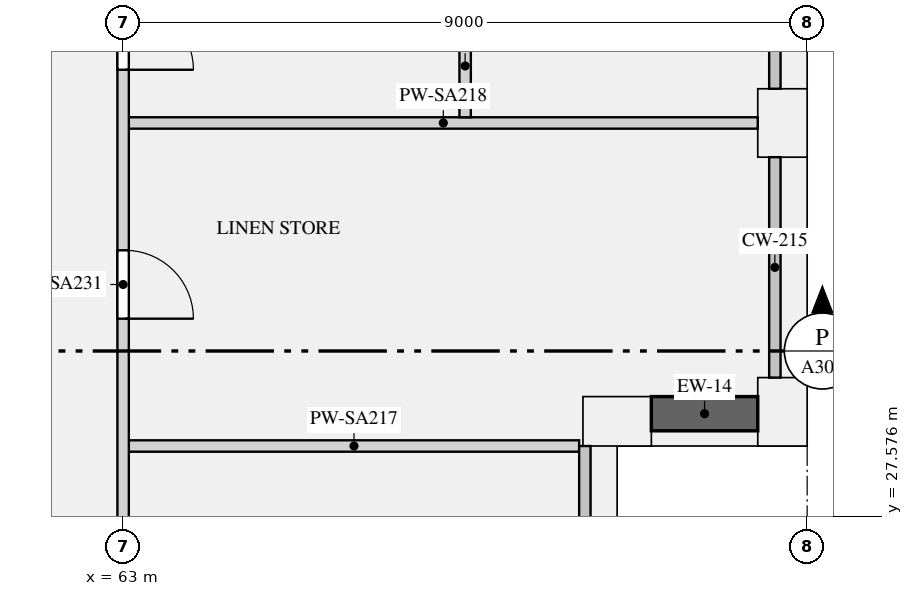
"""IFC4 building model, lengths in metres.
Left out: names, types, materials, properties, quantities, classifications, styles, units other than length and angle.
Written with IfcOpenShell. Run it as: python <this file> out.ifc"""

import sys

from ifc_helpers import new_model, si_unit, direction, frame, frame_2d, origin, origin_2d, place, context, subcontext, project, spatial, rectangle, extrude, element, fill, save


model = new_model("IFC4")
c1 = context("Model", 3, precision=1e-05, world=origin(), true_north=direction((0.0, 1.0)))
c2 = subcontext(c1, "Body", "Model", "MODEL_VIEW")
j1 = project(units=[si_unit("LENGTHUNIT", "METRE"), si_unit("PLANEANGLEUNIT", "RADIAN")], contexts=[c1])
p1 = place(None, origin())
s1 = spatial("IfcSite", under=j1, at=p1, CompositionType="ELEMENT")
p2 = place(p1, origin())
s2 = spatial("IfcBuilding", under=s1, at=p2, CompositionType="ELEMENT")
p3 = place(p2, frame((0.0, 0.0, 191.7)))
s3 = spatial("IfcBuildingStorey", under=s2, at=p3, CompositionType="ELEMENT", Elevation=191.7)
for number, where, z_axis, x_axis in (
    (1, (69.5, 28.825, 0.0), (0.0, 0.0, 1.0), (1.0, 0.0, 0.0)),
    (2, (71.675, 28.95, 0.0), (0.0, 0.0, 1.0), (0.0, 1.0, 0.0)),
    (3, (71.675, 32.75, 0.0), (0.0, 0.0, 1.0), (0.0, 1.0, 0.0)),
):
    element("IfcColumn", number, at=place(p3, frame(where, z_axis=z_axis, x_axis=x_axis)), inside=s3, PredefinedType="USERDEFINED", context=c2, shape_type="SweptSolid", body=[
        extrude(rectangle(XDim=0.9, YDim=0.65, at=origin_2d()), origin(), (0.0, 0.0, 1.0), 6.3),
    ])
p4 = place(p3, frame((69.95, 28.925, 0.9), z_axis=(0.0, 0.0, 1.0), x_axis=(1.0, 0.0, 0.0)))
e4 = element("IfcWall", 4, at=p4, inside=s3, PredefinedType="SOLIDWALL", context=c2, shape_type="SweptSolid", body=[
    extrude(rectangle(XDim=1.4, YDim=0.45, at=frame_2d((0.7, 0.0))), origin(), (0.0, 0.0, 1.0), 5.08),
])
p5 = place(p3, frame((63.075, 28.5, 0.0), z_axis=(0.0, 0.0, 1.0), x_axis=(1.0, 0.0, 0.0)))
e5 = element("IfcWall", 5, at=p5, inside=s3, PredefinedType="PARTITIONING", context=c2, shape_type="SweptSolid", body=[
    extrude(rectangle(XDim=5.925, YDim=0.15, at=frame_2d((2.962, 0.0))), origin(), (0.0, 0.0, 1.0), 5.98),
])
p6 = place(p3, frame((63.075, 32.75, 0.0), z_axis=(0.0, 0.0, 1.0), x_axis=(1.0, 0.0, 0.0)))
e6 = element("IfcWall", 6, at=p6, inside=s3, PredefinedType="PARTITIONING", context=c2, shape_type="SweptSolid", body=[
    extrude(rectangle(XDim=8.275, YDim=0.15, at=frame_2d((4.138, 0.0))), origin(), (0.0, 0.0, 1.0), 5.98),
])
p7 = place(p3, frame((63.0, 16.575, 0.0), z_axis=(0.0, 0.0, 1.0), x_axis=(0.0, 1.0, 0.0)))
e7 = element("IfcWall", 7, at=p7, inside=s3, PredefinedType="PARTITIONING", context=c2, shape_type="SweptSolid", body=[
    extrude(rectangle(XDim=24.275, YDim=0.15, at=frame_2d((12.138, 0.0))), origin(), (0.0, 0.0, 1.0), 5.98),
])
p8 = place(p7, frame((2.7, 0.0, 0.0)))
e8 = element("IfcOpeningElement", 8, at=p8, cuts=e7, PredefinedType="OPENING", context=c2, shape_type="SweptSolid", body=[
    extrude(rectangle(XDim=1.5, YDim=2.1, at=frame_2d((0.75, 1.05))), frame((0.0, 0.085, 0.0), z_axis=(0.0, -1.0, 0.0), x_axis=(1.0, 0.0, 0.0)), (0.0, 0.0, 1.0), 0.17),
])
p9 = place(p7, frame((9.475, 0.0, 0.0)))
e9 = element("IfcOpeningElement", 9, at=p9, cuts=e7, PredefinedType="OPENING", context=c2, shape_type="SweptSolid", body=[
    extrude(rectangle(XDim=0.9, YDim=2.1, at=frame_2d((0.45, 1.05))), frame((0.0, 0.085, 0.0), z_axis=(0.0, -1.0, 0.0), x_axis=(1.0, 0.0, 0.0)), (0.0, 0.0, 1.0), 0.17),
])
p10 = place(p7, frame((13.6, 0.0, 0.0)))
e10 = element("IfcOpeningElement", 10, at=p10, cuts=e7, PredefinedType="OPENING", context=c2, shape_type="SweptSolid", body=[
    extrude(rectangle(XDim=0.9, YDim=2.1, at=frame_2d((0.45, 1.05))), frame((0.0, 0.085, 0.0), z_axis=(0.0, -1.0, 0.0), x_axis=(1.0, 0.0, 0.0)), (0.0, 0.0, 1.0), 0.17),
])
p11 = place(p7, frame((16.875, 0.0, 0.0)))
e11 = element("IfcOpeningElement", 11, at=p11, cuts=e7, PredefinedType="OPENING", context=c2, shape_type="SweptSolid", body=[
    extrude(rectangle(XDim=0.9, YDim=2.1, at=frame_2d((0.45, 1.05))), frame((0.0, 0.085, 0.0), z_axis=(0.0, -1.0, 0.0), x_axis=(1.0, 0.0, 0.0)), (0.0, 0.0, 1.0), 0.17),
])
p12 = place(p3, frame((67.5, 32.825, 0.0), z_axis=(0.0, 0.0, 1.0), x_axis=(0.0, 1.0, 0.0)))
e12 = element("IfcWall", 12, at=p12, inside=s3, PredefinedType="PARTITIONING", context=c2, shape_type="SweptSolid", body=[
    extrude(rectangle(XDim=3.525, YDim=0.15, at=frame_2d((1.763, 0.0))), origin(), (0.0, 0.0, 1.0), 5.98),
])
p13 = place(p12, frame((1.35, 0.0, 0.0)))
e13 = element("IfcOpeningElement", 13, at=p13, cuts=e12, PredefinedType="OPENING", context=c2, shape_type="SweptSolid", body=[
    extrude(rectangle(XDim=0.9, YDim=2.1, at=frame_2d((0.45, 1.05))), frame((0.0, 0.085, 0.0), z_axis=(0.0, -1.0, 0.0), x_axis=(1.0, 0.0, 0.0)), (0.0, 0.0, 1.0), 0.17),
])
p14 = place(p10, frame((0.9, 0.0, 0.0), z_axis=(0.0, 0.0, 1.0), x_axis=(-1.0, 0.0, 0.0)))
e14 = element("IfcDoor", 14, at=p14, inside=s3, OperationType="SINGLE_SWING_RIGHT", PredefinedType="DOOR", context=c2, shape_type="SweptSolid", body=[
    extrude(rectangle(XDim=0.9, YDim=2.1, at=frame_2d((0.45, 1.05))), frame((0.0, 0.025, 0.0), z_axis=(0.0, -1.0, 0.0), x_axis=(1.0, 0.0, 0.0)), (0.0, 0.0, 1.0), 0.05),
])
fill(e10, e14)
p15 = place(p11, frame((0.9, 0.0, 0.0), z_axis=(0.0, 0.0, 1.0), x_axis=(-1.0, 0.0, 0.0)))
e15 = element("IfcDoor", 15, at=p15, inside=s3, OperationType="SINGLE_SWING_RIGHT", PredefinedType="DOOR", context=c2, shape_type="SweptSolid", body=[
    extrude(rectangle(XDim=0.9, YDim=2.1, at=frame_2d((0.45, 1.05))), frame((0.0, 0.025, 0.0), z_axis=(0.0, -1.0, 0.0), x_axis=(1.0, 0.0, 0.0)), (0.0, 0.0, 1.0), 0.05),
])
fill(e11, e15)
save(model, sys.argv[1])
